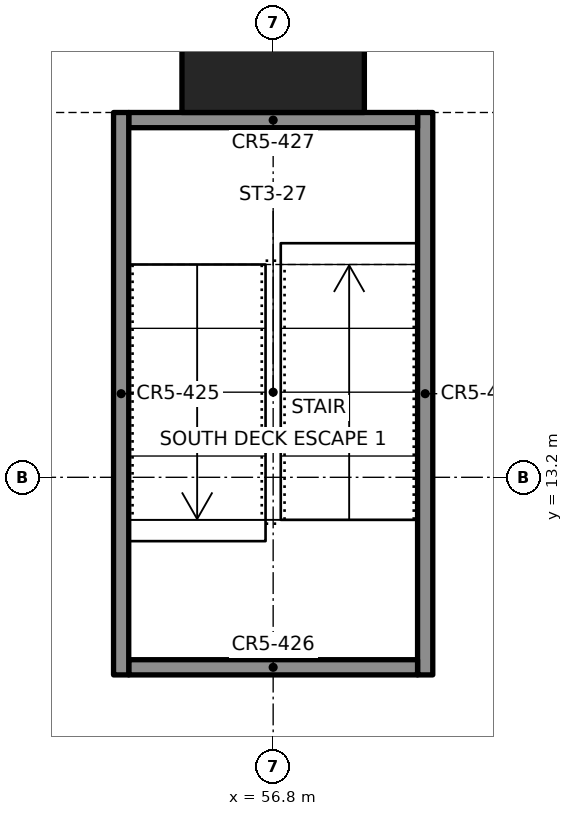
"""IFC4 building model, lengths in metres.
Left out: names, types, materials, properties, quantities, classifications, styles, units other than length and angle.
Written with IfcOpenShell. Run it as: python <this file> out.ifc"""

import sys

from ifc_helpers import new_model, si_unit, direction, frame, frame_2d, origin, origin_2d, place, context, subcontext, project, spatial, rectangle, extrude, element, save


model = new_model("IFC4")
c1 = context("Model", 3, precision=1e-05, world=origin(), true_north=direction((0.0, 1.0)))
c2 = subcontext(c1, "Body", "Model", "MODEL_VIEW")
j1 = project(units=[si_unit("LENGTHUNIT", "METRE"), si_unit("PLANEANGLEUNIT", "RADIAN")], contexts=[c1])
p1 = place(None, origin())
s1 = spatial("IfcSite", under=j1, at=p1, CompositionType="ELEMENT")
p2 = place(p1, origin())
s2 = spatial("IfcBuilding", under=s1, at=p2, CompositionType="ELEMENT")
p3 = place(p2, frame((0.0, 0.0, 4.4)))
s3 = spatial("IfcBuildingStorey", under=s2, at=p3, CompositionType="ELEMENT", Elevation=4.4)
p4 = place(p3, frame((56.8, 19.2, 0.0), z_axis=(0.0, 0.0, 1.0), x_axis=(1.0, 0.0, 0.0)))
e1 = element("IfcColumn", 1, at=p4, inside=s3, PredefinedType="COLUMN", context=c2, shape_type="SweptSolid", body=[
    extrude(rectangle(XDim=2.4, YDim=2.4, at=origin_2d()), origin(), (0.0, 0.0, 1.0), 4.4),
])
for number, where, z_axis, x_axis in (
    (2, (54.8, 10.6, 0.0), (0.0, 0.0, 1.0), (0.0, 1.0, 0.0)),
    (3, (58.8, 18.0, 0.0), (0.0, 0.0, 1.0), (0.0, -1.0, 0.0)),
):
    element("IfcWall", number, at=place(p3, frame(where, z_axis=z_axis, x_axis=x_axis)), inside=s3, PredefinedType="SOLIDWALL", context=c2, shape_type="SweptSolid", body=[
        extrude(rectangle(XDim=7.4, YDim=0.2, at=frame_2d((3.7, 0.0))), origin(), (0.0, 0.0, 1.0), 4.4),
    ])
for number, where, z_axis, x_axis in (
    (4, (54.9, 10.7, 0.0), (0.0, 0.0, 1.0), (1.0, 0.0, 0.0)),
    (5, (54.9, 17.9, 0.0), (0.0, 0.0, 1.0), (1.0, 0.0, 0.0)),
):
    element("IfcWall", number, at=place(p3, frame(where, z_axis=z_axis, x_axis=x_axis)), inside=s3, PredefinedType="SOLIDWALL", context=c2, shape_type="SweptSolid", body=[
        extrude(rectangle(XDim=3.8, YDim=0.2, at=frame_2d((1.9, 0.0))), origin(), (0.0, 0.0, 1.0), 4.4),
    ])
save(model, sys.argv[1])
